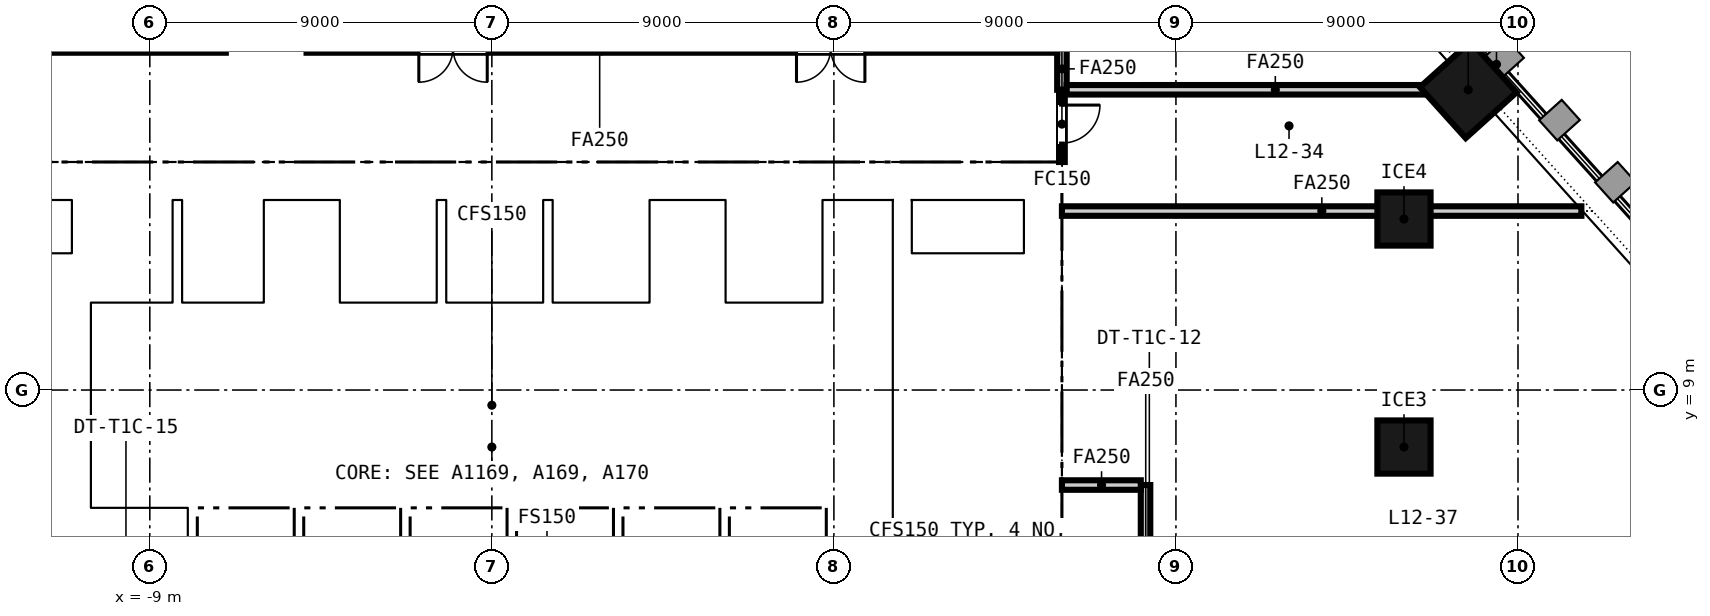
"""IFC4 building model, lengths in metres.
Left out: names, types, materials, properties, quantities, classifications, styles, units other than length and angle.
Written with IfcOpenShell. Run it as: python <this file> out.ifc"""

import sys

from ifc_helpers import new_model, si_unit, direction, frame, frame_2d, origin, origin_2d, place, context, subcontext, project, spatial, rectangle, extrude, element, fill, save


model = new_model("IFC4")
c1 = context("Model", 3, precision=1e-05, world=origin(), true_north=direction((0.0, 1.0)))
c2 = subcontext(c1, "Body", "Model", "MODEL_VIEW")
j1 = project(units=[si_unit("LENGTHUNIT", "METRE"), si_unit("PLANEANGLEUNIT", "RADIAN")], contexts=[c1])
p1 = place(None, origin())
s1 = spatial("IfcSite", under=j1, at=p1, CompositionType="ELEMENT")
p2 = place(p1, origin())
s2 = spatial("IfcBuilding", under=s1, at=p2, CompositionType="ELEMENT")
p3 = place(p2, frame((0.0, 0.0, 57.9)))
s3 = spatial("IfcBuildingStorey", under=s2, at=p3, CompositionType="ELEMENT", Elevation=57.9)
p4 = place(p3, frame((-15.0, 14.5, -0.15), z_axis=(0.0, 0.0, 1.0), x_axis=(1.0, 0.0, 0.0)))
e1 = element("IfcWall", 1, at=p4, inside=s3, PredefinedType="SOLIDWALL", context=c2, shape_type="SweptSolid", body=[
    extrude(rectangle(XDim=30.0, YDim=1.0, at=frame_2d((15.0, 0.0))), origin(), (0.0, 0.0, 1.0), 3.65),
])
p5 = place(p4, frame((9.25, 0.0, 0.15)))
e2 = element("IfcOpeningElement", 2, at=p5, cuts=e1, PredefinedType="OPENING", context=c2, shape_type="SweptSolid", body=[
    extrude(rectangle(XDim=1.5, YDim=2.1, at=frame_2d((0.75, 1.05))), frame((0.0, 0.51, 0.0), z_axis=(0.0, -1.0, 0.0), x_axis=(1.0, 0.0, 0.0)), (0.0, 0.0, 1.0), 1.02),
])
p6 = place(p4, frame((19.4, 0.0, 0.15)))
e3 = element("IfcOpeningElement", 3, at=p6, cuts=e1, PredefinedType="OPENING", context=c2, shape_type="SweptSolid", body=[
    extrude(rectangle(XDim=1.5, YDim=2.1, at=frame_2d((0.75, 1.05))), frame((0.0, 0.51, 0.0), z_axis=(0.0, -1.0, 0.0), x_axis=(1.0, 0.0, 0.0)), (0.0, 0.0, 1.0), 1.02),
])
p7 = place(p4, frame((1.5, 0.0, 0.15)))
e4 = element("IfcOpeningElement", 4, at=p7, cuts=e1, PredefinedType="OPENING", context=c2, shape_type="SweptSolid", body=[
    extrude(rectangle(XDim=1.2, YDim=2.1, at=frame_2d((0.6, 1.05))), frame((0.0, 0.51, 0.0), z_axis=(0.0, -1.0, 0.0), x_axis=(1.0, 0.0, 0.0)), (0.0, 0.0, 1.0), 1.02),
])
p8 = place(p4, frame((27.3, 0.0, 0.15)))
e5 = element("IfcOpeningElement", 5, at=p8, cuts=e1, PredefinedType="OPENING", context=c2, shape_type="SweptSolid", body=[
    extrude(rectangle(XDim=1.2, YDim=2.1, at=frame_2d((0.6, 1.05))), frame((0.0, 0.51, 0.0), z_axis=(0.0, -1.0, 0.0), x_axis=(1.0, 0.0, 0.0)), (0.0, 0.0, 1.0), 1.02),
])
p9 = place(p3, frame((14.5, 1.0, -0.15), z_axis=(0.0, 0.0, 1.0), x_axis=(0.0, 1.0, 0.0)))
e6 = element("IfcWall", 6, at=p9, inside=s3, PredefinedType="SOLIDWALL", context=c2, shape_type="SweptSolid", body=[
    extrude(rectangle(XDim=13.0, YDim=1.0, at=frame_2d((6.5, 0.0))), origin(), (0.0, 0.0, 1.0), 3.65),
])
for number, where, z_axis, x_axis in (
    (7, (-10.8, 1.0, -0.15), (0.0, 0.0, 1.0), (0.0, 1.0, 0.0)),
    (8, (10.8, 1.0, -0.15), (0.0, 0.0, 1.0), (0.0, 1.0, 0.0)),
):
    element("IfcWall", number, at=place(p3, frame(where, z_axis=z_axis, x_axis=x_axis)), inside=s3, PredefinedType="SOLIDWALL", context=c2, shape_type="SweptSolid", body=[
        extrude(rectangle(XDim=13.0, YDim=0.5, at=frame_2d((6.5, 0.0))), origin(), (0.0, 0.0, 1.0), 3.65),
    ])
p10 = place(p3, frame((25.691, 16.9, -0.15), z_axis=(0.0, 0.0, 1.0), x_axis=(-0.669130606359, 0.743144825477, 0.0)))
e9 = element("IfcColumn", 9, at=p10, inside=s3, PredefinedType="COLUMN", context=c2, shape_type="SweptSolid", body=[
    extrude(rectangle(XDim=1.8, YDim=1.8, at=origin_2d()), origin(), (0.0, 0.0, 1.0), 3.65),
])
for number, where, z_axis, x_axis in (
    (10, (24.0, 7.5, -0.15), (0.0, 0.0, 1.0), (1.0, 0.0, 0.0)),
    (11, (24.0, 13.5, -0.15), (0.0, 0.0, 1.0), (1.0, 0.0, 0.0)),
):
    element("IfcColumn", number, at=place(p3, frame(where, z_axis=z_axis, x_axis=x_axis)), inside=s3, PredefinedType="COLUMN", context=c2, shape_type="SweptSolid", body=[
        extrude(rectangle(XDim=1.4, YDim=1.4, at=origin_2d()), origin(), (0.0, 0.0, 1.0), 3.65),
    ])
p11 = place(p3, frame((-10.55, 6.025, 0.0), z_axis=(0.0, 0.0, 1.0), x_axis=(1.0, 0.0, 0.0)))
e12 = element("IfcWall", 12, at=p11, inside=s3, PredefinedType="PARTITIONING", context=c2, shape_type="SweptSolid", body=[
    extrude(rectangle(XDim=21.1, YDim=0.25, at=frame_2d((10.55, 0.0))), origin(), (0.0, 0.0, 1.0), 3.5),
])
p12 = place(p3, frame((-4.125, 8.55, 0.0), z_axis=(0.0, 0.0, 1.0), x_axis=(1.0, 0.0, 0.0)))
e13 = element("IfcWall", 13, at=p12, inside=s3, PredefinedType="PARTITIONING", context=c2, shape_type="SweptSolid", body=[
    extrude(rectangle(XDim=14.675, YDim=0.2, at=frame_2d((7.337, 0.0))), origin(), (0.0, 0.0, 1.0), 3.5),
])
p13 = place(p12, frame((1.413, 0.0, 0.0)))
e14 = element("IfcOpeningElement", 14, at=p13, cuts=e13, PredefinedType="OPENING", context=c2, shape_type="SweptSolid", body=[
    extrude(rectangle(XDim=1.0, YDim=2.1, at=frame_2d((0.5, 1.05))), frame((0.0, 0.11, 0.0), z_axis=(0.0, -1.0, 0.0), x_axis=(1.0, 0.0, 0.0)), (0.0, 0.0, 1.0), 0.22),
])
p14 = place(p12, frame((5.0, 0.0, 0.0)))
e15 = element("IfcOpeningElement", 15, at=p14, cuts=e13, PredefinedType="OPENING", context=c2, shape_type="SweptSolid", body=[
    extrude(rectangle(XDim=1.0, YDim=2.1, at=frame_2d((0.5, 1.05))), frame((0.0, 0.11, 0.0), z_axis=(0.0, -1.0, 0.0), x_axis=(1.0, 0.0, 0.0)), (0.0, 0.0, 1.0), 0.22),
])
p15 = place(p12, frame((9.613, 0.0, 0.0)))
e16 = element("IfcOpeningElement", 16, at=p15, cuts=e13, PredefinedType="OPENING", context=c2, shape_type="SweptSolid", body=[
    extrude(rectangle(XDim=1.0, YDim=2.1, at=frame_2d((0.5, 1.05))), frame((0.0, 0.11, 0.0), z_axis=(0.0, -1.0, 0.0), x_axis=(1.0, 0.0, 0.0)), (0.0, 0.0, 1.0), 0.22),
])
p16 = place(p12, frame((13.475, 0.0, 0.0)))
e17 = element("IfcOpeningElement", 17, at=p16, cuts=e13, PredefinedType="OPENING", context=c2, shape_type="SweptSolid", body=[
    extrude(rectangle(XDim=0.9, YDim=2.1, at=frame_2d((0.45, 1.05))), frame((0.0, 0.11, 0.0), z_axis=(0.0, -1.0, 0.0), x_axis=(1.0, 0.0, 0.0)), (0.0, 0.0, 1.0), 0.22),
])
p17 = place(p3, frame((-10.55, 11.2, 0.0), z_axis=(0.0, 0.0, 1.0), x_axis=(1.0, 0.0, 0.0)))
e18 = element("IfcWall", 18, at=p17, inside=s3, PredefinedType="PARTITIONING", context=c2, shape_type="SweptSolid", body=[
    extrude(rectangle(XDim=4.8, YDim=0.2, at=frame_2d((2.4, 0.0))), origin(), (0.0, 0.0, 1.0), 3.5),
])
p18 = place(p17, frame((0.525, 0.0, 0.0)))
e19 = element("IfcOpeningElement", 19, at=p18, cuts=e18, PredefinedType="OPENING", context=c2, shape_type="SweptSolid", body=[
    extrude(rectangle(XDim=1.1, YDim=2.1, at=frame_2d((0.55, 1.05))), frame((0.0, 0.11, 0.0), z_axis=(0.0, -1.0, 0.0), x_axis=(1.0, 0.0, 0.0)), (0.0, 0.0, 1.0), 0.22),
])
p19 = place(p17, frame((2.925, 0.0, 0.0)))
e20 = element("IfcOpeningElement", 20, at=p19, cuts=e18, PredefinedType="OPENING", context=c2, shape_type="SweptSolid", body=[
    extrude(rectangle(XDim=1.1, YDim=2.1, at=frame_2d((0.55, 1.05))), frame((0.0, 0.11, 0.0), z_axis=(0.0, -1.0, 0.0), x_axis=(1.0, 0.0, 0.0)), (0.0, 0.0, 1.0), 0.22),
])
p20 = place(p3, frame((-4.25, 11.2, 0.0), z_axis=(0.0, 0.0, 1.0), x_axis=(1.0, 0.0, 0.0)))
e21 = element("IfcWall", 21, at=p20, inside=s3, PredefinedType="PARTITIONING", context=c2, shape_type="SweptSolid", body=[
    extrude(rectangle(XDim=8.65, YDim=0.2, at=frame_2d((4.325, 0.0))), origin(), (0.0, 0.0, 1.0), 3.5),
])
p21 = place(p20, frame((0.825, 0.0, 0.0)))
e22 = element("IfcOpeningElement", 22, at=p21, cuts=e21, PredefinedType="OPENING", context=c2, shape_type="SweptSolid", body=[
    extrude(rectangle(XDim=1.4, YDim=2.1, at=frame_2d((0.7, 1.05))), frame((0.0, 0.11, 0.0), z_axis=(0.0, -1.0, 0.0), x_axis=(1.0, 0.0, 0.0)), (0.0, 0.0, 1.0), 0.22),
])
p22 = place(p20, frame((3.625, 0.0, 0.0)))
e23 = element("IfcOpeningElement", 23, at=p22, cuts=e21, PredefinedType="OPENING", context=c2, shape_type="SweptSolid", body=[
    extrude(rectangle(XDim=1.4, YDim=2.1, at=frame_2d((0.7, 1.05))), frame((0.0, 0.11, 0.0), z_axis=(0.0, -1.0, 0.0), x_axis=(1.0, 0.0, 0.0)), (0.0, 0.0, 1.0), 0.22),
])
p23 = place(p3, frame((5.9, 11.2, 0.0), z_axis=(0.0, 0.0, 1.0), x_axis=(1.0, 0.0, 0.0)))
e24 = element("IfcWall", 24, at=p23, inside=s3, PredefinedType="PARTITIONING", context=c2, shape_type="SweptSolid", body=[
    extrude(rectangle(XDim=4.65, YDim=0.2, at=frame_2d((2.325, 0.0))), origin(), (0.0, 0.0, 1.0), 3.5),
])
p24 = place(p23, frame((3.4, 0.0, 0.0)))
e25 = element("IfcOpeningElement", 25, at=p24, cuts=e24, PredefinedType="OPENING", context=c2, shape_type="SweptSolid", body=[
    extrude(rectangle(XDim=0.9, YDim=2.1, at=frame_2d((0.45, 1.05))), frame((0.0, 0.11, 0.0), z_axis=(0.0, -1.0, 0.0), x_axis=(1.0, 0.0, 0.0)), (0.0, 0.0, 1.0), 0.22),
])
p25 = place(p3, frame((-4.125, 6.15, 0.0), z_axis=(0.0, 0.0, 1.0), x_axis=(0.0, 1.0, 0.0)))
e26 = element("IfcWall", 26, at=p25, inside=s3, PredefinedType="PARTITIONING", context=c2, shape_type="SweptSolid", body=[
    extrude(rectangle(XDim=4.95, YDim=0.25, at=frame_2d((2.475, 0.0))), origin(), (0.0, 0.0, 1.0), 3.5),
])
p26 = place(p25, frame((3.125, 0.0, 0.0)))
e27 = element("IfcOpeningElement", 27, at=p26, cuts=e26, PredefinedType="OPENING", context=c2, shape_type="SweptSolid", body=[
    extrude(rectangle(XDim=1.2, YDim=2.1, at=frame_2d((0.6, 1.05))), frame((0.0, 0.135, 0.0), z_axis=(0.0, -1.0, 0.0), x_axis=(1.0, 0.0, 0.0)), (0.0, 0.0, 1.0), 0.27),
])
for number, where, z_axis, x_axis in (
    (28, (-7.875, 3.6, 0.0), (0.0, 0.0, 1.0), (0.0, 1.0, 0.0)),
    (29, (-5.075, 3.6, 0.0), (0.0, 0.0, 1.0), (0.0, 1.0, 0.0)),
    (30, (-2.275, 3.6, 0.0), (0.0, 0.0, 1.0), (0.0, 1.0, 0.0)),
    (31, (0.525, 3.6, 0.0), (0.0, 0.0, 1.0), (0.0, 1.0, 0.0)),
    (32, (3.325, 3.6, 0.0), (0.0, 0.0, 1.0), (0.0, 1.0, 0.0)),
    (33, (6.125, 3.6, 0.0), (0.0, 0.0, 1.0), (0.0, 1.0, 0.0)),
    (34, (8.925, 3.6, 0.0), (0.0, 0.0, 1.0), (0.0, 1.0, 0.0)),
):
    element("IfcWall", number, at=place(p3, frame(where, z_axis=z_axis, x_axis=x_axis)), inside=s3, PredefinedType="PARTITIONING", context=c2, shape_type="SweptSolid", body=[
        extrude(rectangle(XDim=2.3, YDim=0.25, at=frame_2d((1.15, 0.0))), origin(), (0.0, 0.0, 1.0), 3.5),
    ])
for number, where, z_axis, x_axis in (
    (35, (-0.35, 6.15, 0.0), (0.0, 0.0, 1.0), (0.0, 1.0, 0.0)),
    (36, (3.1, 6.15, 0.0), (0.0, 0.0, 1.0), (0.0, 1.0, 0.0)),
):
    element("IfcWall", number, at=place(p3, frame(where, z_axis=z_axis, x_axis=x_axis)), inside=s3, PredefinedType="PARTITIONING", context=c2, shape_type="SweptSolid", body=[
        extrude(rectangle(XDim=2.3, YDim=0.15, at=frame_2d((1.15, 0.0))), origin(), (0.0, 0.0, 1.0), 3.5),
    ])
p27 = place(p3, frame((8.925, 6.15, 0.0), z_axis=(0.0, 0.0, 1.0), x_axis=(0.0, 1.0, 0.0)))
e37 = element("IfcWall", 37, at=p27, inside=s3, PredefinedType="PARTITIONING", context=c2, shape_type="SweptSolid", body=[
    extrude(rectangle(XDim=2.3, YDim=0.25, at=frame_2d((1.15, 0.0))), origin(), (0.0, 0.0, 1.0), 3.5),
])
for number, where, z_axis, x_axis in (
    (38, (-8.275, 11.3, 0.0), (0.0, 0.0, 1.0), (0.0, 1.0, 0.0)),
    (39, (-5.875, 11.3, 0.0), (0.0, 0.0, 1.0), (0.0, 1.0, 0.0)),
    (40, (-4.125, 11.3, 0.0), (0.0, 0.0, 1.0), (0.0, 1.0, 0.0)),
    (41, (-1.325, 11.3, 0.0), (0.0, 0.0, 1.0), (0.0, 1.0, 0.0)),
    (42, (1.475, 11.3, 0.0), (0.0, 0.0, 1.0), (0.0, 1.0, 0.0)),
    (43, (4.275, 11.3, 0.0), (0.0, 0.0, 1.0), (0.0, 1.0, 0.0)),
    (44, (6.025, 11.3, 0.0), (0.0, 0.0, 1.0), (0.0, 1.0, 0.0)),
    (45, (8.825, 11.3, 0.0), (0.0, 0.0, 1.0), (0.0, 1.0, 0.0)),
):
    element("IfcWall", number, at=place(p3, frame(where, z_axis=z_axis, x_axis=x_axis)), inside=s3, PredefinedType="PARTITIONING", context=c2, shape_type="SweptSolid", body=[
        extrude(rectangle(XDim=2.7, YDim=0.25, at=frame_2d((1.35, 0.0))), origin(), (0.0, 0.0, 1.0), 3.5),
    ])
for number, where, z_axis, x_axis in (
    (46, (-14.0, 7.35, -0.15), (0.0, 0.0, 1.0), (1.0, 0.0, 0.0)),
    (47, (11.05, 7.35, -0.15), (0.0, 0.0, 1.0), (1.0, 0.0, 0.0)),
):
    element("IfcWall", number, at=place(p3, frame(where, z_axis=z_axis, x_axis=x_axis)), inside=s3, PredefinedType="SOLIDWALL", context=c2, shape_type="SweptSolid", body=[
        extrude(rectangle(XDim=2.95, YDim=0.3, at=frame_2d((1.475, 0.0))), origin(), (0.0, 0.0, 1.0), 3.65),
    ])
p28 = place(p3, frame((15.0, 18.0, 0.0), z_axis=(0.0, 0.0, 1.0), x_axis=(0.0, -1.0, 0.0)))
e48 = element("IfcWall", 48, at=p28, inside=s3, PredefinedType="PARTITIONING", context=c2, shape_type="SweptSolid", body=[
    extrude(rectangle(XDim=1.1, YDim=0.25, at=frame_2d((0.55, 0.0))), origin(), (0.0, 0.0, 1.0), 2.741),
])
p29 = place(p3, frame((15.0, 16.9, 0.0), z_axis=(0.0, 0.0, 1.0), x_axis=(0.0, -1.0, 0.0)))
e49 = element("IfcWall", 49, at=p29, inside=s3, PredefinedType="PARTITIONING", context=c2, shape_type="SweptSolid", body=[
    extrude(rectangle(XDim=1.9, YDim=0.15, at=frame_2d((0.95, 0.0))), origin(), (0.0, 0.0, 1.0), 2.741),
])
p30 = place(p29, frame((0.403, 0.0, 0.0)))
e50 = element("IfcOpeningElement", 50, at=p30, cuts=e49, PredefinedType="OPENING", context=c2, shape_type="SweptSolid", body=[
    extrude(rectangle(XDim=1.0, YDim=2.1, at=frame_2d((0.5, 1.05))), frame((0.0, 0.085, 0.0), z_axis=(0.0, -1.0, 0.0), x_axis=(1.0, 0.0, 0.0)), (0.0, 0.0, 1.0), 0.17),
])
p31 = place(p3, frame((17.2, 6.5, 0.0), z_axis=(0.0, 0.0, 1.0), x_axis=(0.0, -1.0, 0.0)))
e51 = element("IfcWall", 51, at=p31, inside=s3, PredefinedType="PARTITIONING", context=c2, shape_type="SweptSolid", body=[
    extrude(rectangle(XDim=8.1, YDim=0.25, at=frame_2d((4.05, 0.0))), origin(), (0.0, 0.0, 1.0), 2.741),
])
p32 = place(p3, frame((-12.905, 18.0, 0.0), z_axis=(0.0, 0.0, 1.0), x_axis=(1.0, 0.0, 0.0)))
e52 = element("IfcWall", 52, at=p32, inside=s3, PredefinedType="PARTITIONING", context=c2, shape_type="SweptSolid", body=[
    extrude(rectangle(XDim=5.905, YDim=0.25, at=frame_2d((2.953, 0.0))), origin(), (0.0, 0.0, 1.0), 2.741),
])
p33 = place(p3, frame((-4.875, 18.0, 0.0), z_axis=(0.0, 0.0, 1.0), x_axis=(1.0, 0.0, 0.0)))
e53 = element("IfcWall", 53, at=p33, inside=s3, PredefinedType="PARTITIONING", context=c2, shape_type="SweptSolid", body=[
    extrude(rectangle(XDim=7.707, YDim=0.25, at=frame_2d((3.854, 0.0))), origin(), (0.0, 0.0, 1.0), 2.741),
])
p34 = place(p33, frame((2.954, 0.0, 0.0)))
e54 = element("IfcOpeningElement", 54, at=p34, cuts=e53, PredefinedType="OPENING", context=c2, shape_type="SweptSolid", body=[
    extrude(rectangle(XDim=1.8, YDim=2.1, at=frame_2d((0.9, 1.05))), frame((0.0, 0.135, 0.0), z_axis=(0.0, -1.0, 0.0), x_axis=(1.0, 0.0, 0.0)), (0.0, 0.0, 1.0), 0.27),
])
p35 = place(p3, frame((2.957, 18.0, 0.0), z_axis=(0.0, 0.0, 1.0), x_axis=(1.0, 0.0, 0.0)))
e55 = element("IfcWall", 55, at=p35, inside=s3, PredefinedType="PARTITIONING", context=c2, shape_type="SweptSolid", body=[
    extrude(rectangle(XDim=11.918, YDim=0.25, at=frame_2d((5.959, 0.0))), origin(), (0.0, 0.0, 1.0), 2.741),
])
p36 = place(p35, frame((5.059, 0.0, 0.0)))
e56 = element("IfcOpeningElement", 56, at=p36, cuts=e55, PredefinedType="OPENING", context=c2, shape_type="SweptSolid", body=[
    extrude(rectangle(XDim=1.8, YDim=2.1, at=frame_2d((0.9, 1.05))), frame((0.0, 0.135, 0.0), z_axis=(0.0, -1.0, 0.0), x_axis=(1.0, 0.0, 0.0)), (0.0, 0.0, 1.0), 0.27),
])
p37 = place(p3, frame((15.125, 16.9, 0.0), z_axis=(0.0, 0.0, 1.0), x_axis=(1.0, 0.0, 0.0)))
e57 = element("IfcWall", 57, at=p37, inside=s3, PredefinedType="PARTITIONING", context=c2, shape_type="SweptSolid", body=[
    extrude(rectangle(XDim=10.97, YDim=0.25, at=frame_2d((5.485, 0.0))), origin(), (0.0, 0.0, 1.0), 2.741),
])
p38 = place(p3, frame((15.0, 13.709, 0.0), z_axis=(0.0, 0.0, 1.0), x_axis=(1.0, 0.0, 0.0)))
e58 = element("IfcWall", 58, at=p38, inside=s3, PredefinedType="PARTITIONING", context=c2, shape_type="SweptSolid", body=[
    extrude(rectangle(XDim=13.668, YDim=0.25, at=frame_2d((6.834, 0.0))), origin(), (0.0, 0.0, 1.0), 2.741),
])
p39 = place(p3, frame((15.0, 6.5, 0.0), z_axis=(0.0, 0.0, 1.0), x_axis=(1.0, 0.0, 0.0)))
e59 = element("IfcWall", 59, at=p39, inside=s3, PredefinedType="PARTITIONING", context=c2, shape_type="SweptSolid", body=[
    extrude(rectangle(XDim=2.075, YDim=0.25, at=frame_2d((1.038, 0.0))), origin(), (0.0, 0.0, 1.0), 2.741),
])
p40 = place(p26, origin())
e60 = element("IfcDoor", 60, at=p40, inside=s3, OperationType="SINGLE_SWING_LEFT", PredefinedType="DOOR", context=c2, shape_type="SweptSolid", body=[
    extrude(rectangle(XDim=1.2, YDim=2.1, at=frame_2d((0.6, 1.05))), frame((0.0, 0.025, 0.0), z_axis=(0.0, -1.0, 0.0), x_axis=(1.0, 0.0, 0.0)), (0.0, 0.0, 1.0), 0.05),
])
fill(e27, e60)
p41 = place(p13, origin())
e61 = element("IfcDoor", 61, at=p41, inside=s3, OperationType="SINGLE_SWING_LEFT", PredefinedType="DOOR", context=c2, shape_type="SweptSolid", body=[
    extrude(rectangle(XDim=1.0, YDim=2.1, at=frame_2d((0.5, 1.05))), frame((0.0, 0.025, 0.0), z_axis=(0.0, -1.0, 0.0), x_axis=(1.0, 0.0, 0.0)), (0.0, 0.0, 1.0), 0.05),
])
fill(e14, e61)
p42 = place(p14, origin())
e62 = element("IfcDoor", 62, at=p42, inside=s3, OperationType="SINGLE_SWING_RIGHT", PredefinedType="DOOR", context=c2, shape_type="SweptSolid", body=[
    extrude(rectangle(XDim=1.0, YDim=2.1, at=frame_2d((0.5, 1.05))), frame((0.0, 0.025, 0.0), z_axis=(0.0, -1.0, 0.0), x_axis=(1.0, 0.0, 0.0)), (0.0, 0.0, 1.0), 0.05),
])
fill(e15, e62)
p43 = place(p15, origin())
e63 = element("IfcDoor", 63, at=p43, inside=s3, OperationType="SINGLE_SWING_LEFT", PredefinedType="DOOR", context=c2, shape_type="SweptSolid", body=[
    extrude(rectangle(XDim=1.0, YDim=2.1, at=frame_2d((0.5, 1.05))), frame((0.0, 0.025, 0.0), z_axis=(0.0, -1.0, 0.0), x_axis=(1.0, 0.0, 0.0)), (0.0, 0.0, 1.0), 0.05),
])
fill(e16, e63)
p44 = place(p16, origin())
e64 = element("IfcDoor", 64, at=p44, inside=s3, OperationType="SINGLE_SWING_RIGHT", PredefinedType="DOOR", context=c2, shape_type="SweptSolid", body=[
    extrude(rectangle(XDim=0.9, YDim=2.1, at=frame_2d((0.45, 1.05))), frame((0.0, 0.025, 0.0), z_axis=(0.0, -1.0, 0.0), x_axis=(1.0, 0.0, 0.0)), (0.0, 0.0, 1.0), 0.05),
])
fill(e17, e64)
p45 = place(p18, origin())
e65 = element("IfcDoor", 65, at=p45, inside=s3, OperationType="DOUBLE_DOOR_SLIDING", PredefinedType="DOOR", context=c2, shape_type="SweptSolid", body=[
    extrude(rectangle(XDim=1.1, YDim=2.1, at=frame_2d((0.55, 1.05))), frame((0.0, 0.025, 0.0), z_axis=(0.0, -1.0, 0.0), x_axis=(1.0, 0.0, 0.0)), (0.0, 0.0, 1.0), 0.05),
])
fill(e19, e65)
p46 = place(p19, origin())
e66 = element("IfcDoor", 66, at=p46, inside=s3, OperationType="DOUBLE_DOOR_SLIDING", PredefinedType="DOOR", context=c2, shape_type="SweptSolid", body=[
    extrude(rectangle(XDim=1.1, YDim=2.1, at=frame_2d((0.55, 1.05))), frame((0.0, 0.025, 0.0), z_axis=(0.0, -1.0, 0.0), x_axis=(1.0, 0.0, 0.0)), (0.0, 0.0, 1.0), 0.05),
])
fill(e20, e66)
p47 = place(p21, origin())
e67 = element("IfcDoor", 67, at=p47, inside=s3, OperationType="DOUBLE_DOOR_SLIDING", PredefinedType="DOOR", context=c2, shape_type="SweptSolid", body=[
    extrude(rectangle(XDim=1.4, YDim=2.1, at=frame_2d((0.7, 1.05))), frame((0.0, 0.025, 0.0), z_axis=(0.0, -1.0, 0.0), x_axis=(1.0, 0.0, 0.0)), (0.0, 0.0, 1.0), 0.05),
])
fill(e22, e67)
p48 = place(p22, origin())
e68 = element("IfcDoor", 68, at=p48, inside=s3, OperationType="DOUBLE_DOOR_SLIDING", PredefinedType="DOOR", context=c2, shape_type="SweptSolid", body=[
    extrude(rectangle(XDim=1.4, YDim=2.1, at=frame_2d((0.7, 1.05))), frame((0.0, 0.025, 0.0), z_axis=(0.0, -1.0, 0.0), x_axis=(1.0, 0.0, 0.0)), (0.0, 0.0, 1.0), 0.05),
])
fill(e23, e68)
p49 = place(p24, origin())
e69 = element("IfcDoor", 69, at=p49, inside=s3, OperationType="SINGLE_SWING_LEFT", PredefinedType="DOOR", context=c2, shape_type="SweptSolid", body=[
    extrude(rectangle(XDim=0.9, YDim=2.1, at=frame_2d((0.45, 1.05))), frame((0.0, 0.025, 0.0), z_axis=(0.0, -1.0, 0.0), x_axis=(1.0, 0.0, 0.0)), (0.0, 0.0, 1.0), 0.05),
])
fill(e25, e69)
p50 = place(p5, origin())
e70 = element("IfcDoor", 70, at=p50, inside=s3, OperationType="DOUBLE_DOOR_SINGLE_SWING", PredefinedType="DOOR", context=c2, shape_type="SweptSolid", body=[
    extrude(rectangle(XDim=1.5, YDim=2.1, at=frame_2d((0.75, 1.05))), frame((0.0, 0.025, 0.0), z_axis=(0.0, -1.0, 0.0), x_axis=(1.0, 0.0, 0.0)), (0.0, 0.0, 1.0), 0.05),
])
fill(e2, e70)
p51 = place(p6, origin())
e71 = element("IfcDoor", 71, at=p51, inside=s3, OperationType="DOUBLE_DOOR_SINGLE_SWING", PredefinedType="DOOR", context=c2, shape_type="SweptSolid", body=[
    extrude(rectangle(XDim=1.5, YDim=2.1, at=frame_2d((0.75, 1.05))), frame((0.0, 0.025, 0.0), z_axis=(0.0, -1.0, 0.0), x_axis=(1.0, 0.0, 0.0)), (0.0, 0.0, 1.0), 0.05),
])
fill(e3, e71)
p52 = place(p8, origin())
e72 = element("IfcDoor", 72, at=p52, inside=s3, OperationType="SINGLE_SWING_LEFT", PredefinedType="DOOR", context=c2, shape_type="SweptSolid", body=[
    extrude(rectangle(XDim=1.2, YDim=2.1, at=frame_2d((0.6, 1.05))), frame((0.0, 0.025, 0.0), z_axis=(0.0, -1.0, 0.0), x_axis=(1.0, 0.0, 0.0)), (0.0, 0.0, 1.0), 0.05),
])
fill(e5, e72)
p53 = place(p30, origin())
e73 = element("IfcDoor", 73, at=p53, inside=s3, OperationType="SINGLE_SWING_LEFT", PredefinedType="DOOR", context=c2, shape_type="SweptSolid", body=[
    extrude(rectangle(XDim=1.0, YDim=2.1, at=frame_2d((0.5, 1.05))), frame((0.0, 0.025, 0.0), z_axis=(0.0, -1.0, 0.0), x_axis=(1.0, 0.0, 0.0)), (0.0, 0.0, 1.0), 0.05),
])
fill(e50, e73)
save(model, sys.argv[1])
